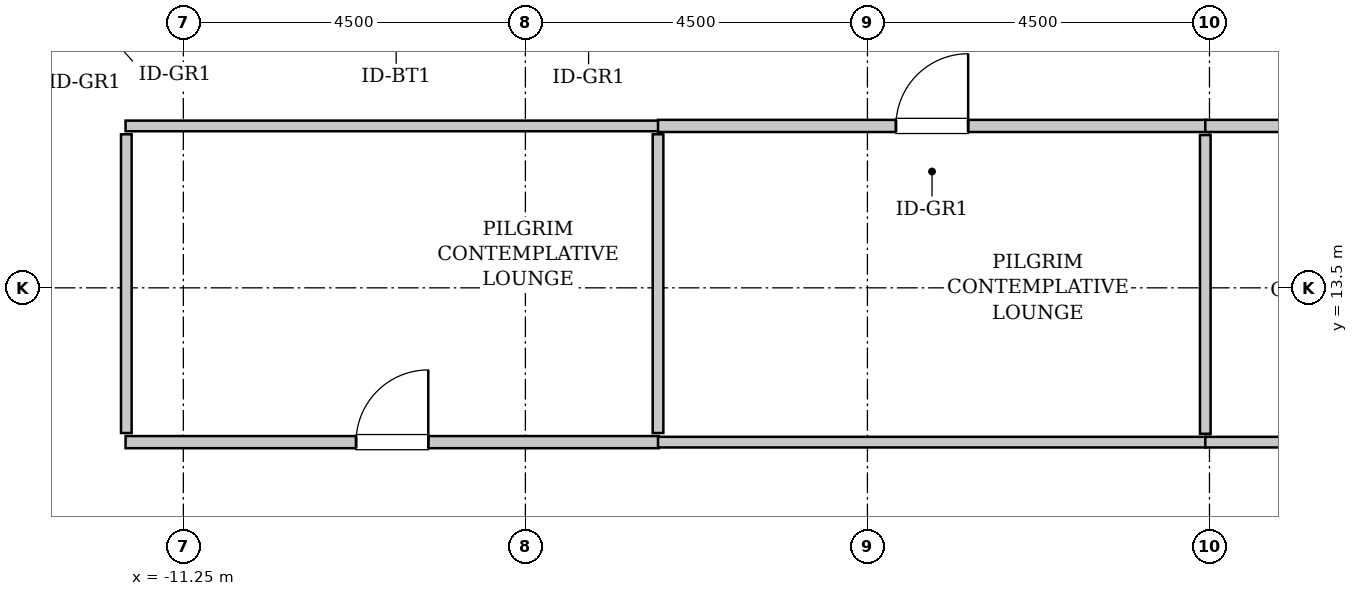
"""IFC4 building model, lengths in metres.
Left out: names, types, materials, properties, quantities, classifications, styles, units other than length and angle.
Written with IfcOpenShell. Run it as: python <this file> out.ifc"""

import sys

from ifc_helpers import new_model, si_unit, direction, frame, frame_2d, origin, place, context, subcontext, project, spatial, rectangle, extrude, source, transform, mapped, element, fill, save


model = new_model("IFC4")
c1 = context("Model", 3, precision=1e-05, world=origin(), true_north=direction((0.0, 1.0)))
c2 = subcontext(c1, "Body", "Model", "MODEL_VIEW")
j1 = project(units=[si_unit("LENGTHUNIT", "METRE"), si_unit("PLANEANGLEUNIT", "RADIAN")], contexts=[c1])
p1 = place(None, origin())
s1 = spatial("IfcSite", under=j1, at=p1, CompositionType="ELEMENT")
p2 = place(p1, origin())
s2 = spatial("IfcBuilding", under=s1, at=p2, CompositionType="ELEMENT")
p3 = place(p2, frame((0.0, 0.0, 248.4)))
s3 = spatial("IfcBuildingStorey", under=s2, at=p3, CompositionType="ELEMENT", Elevation=248.4)
m1 = source(origin(), c2, "Body", "SweptSolid", [
    extrude(rectangle(XDim=7.015, YDim=0.16, at=frame_2d((3.507, 0.0))), origin(), (0.0, 0.0, 1.0), 3.535),
])
p4 = place(p3, frame((-12.01, 11.47, 0.0), z_axis=(0.0, 0.0, 1.0), x_axis=(1.0, 0.0, 0.0)))
e1 = element("IfcWall", 1, at=p4, inside=s3, PredefinedType="PARTITIONING", context=c2, shape_type="MappedRepresentation", body=[
    mapped(m1, transform((0.0, 0.0, 0.0), x_axis=(1.0, 0.0, 0.0), y_axis=(0.0, 1.0, 0.0), z_axis=(0.0, 0.0, 1.0), scale=1.0)),
])
p5 = place(p4, frame((3.032, 0.0, 0.0)))
e2 = element("IfcOpeningElement", 2, at=p5, cuts=e1, PredefinedType="OPENING", context=c2, shape_type="SweptSolid", body=[
    extrude(rectangle(XDim=0.95, YDim=2.1, at=frame_2d((0.475, 1.05))), frame((0.0, 0.09, 0.0), z_axis=(0.0, -1.0, 0.0), x_axis=(1.0, 0.0, 0.0)), (0.0, 0.0, 1.0), 0.18),
])
m2 = source(origin(), c2, "Body", "SweptSolid", [
    extrude(rectangle(XDim=7.015, YDim=0.14, at=frame_2d((3.507, 0.0))), origin(), (0.0, 0.0, 1.0), 3.535),
])
p6 = place(p3, frame((-12.01, 15.63, 0.0), z_axis=(0.0, 0.0, 1.0), x_axis=(1.0, 0.0, 0.0)))
e3 = element("IfcWall", 3, at=p6, inside=s3, PredefinedType="PARTITIONING", context=c2, shape_type="MappedRepresentation", body=[
    mapped(m2, transform((0.0, 0.0, 0.0), x_axis=(1.0, 0.0, 0.0), y_axis=(0.0, 1.0, 0.0), z_axis=(0.0, 0.0, 1.0), scale=1.0)),
])
m3 = source(origin(), c2, "Body", "SweptSolid", [
    extrude(rectangle(XDim=3.93, YDim=0.14, at=frame_2d((1.965, 0.0))), origin(), (0.0, 0.0, 1.0), 3.535),
])
for number, where, z_axis, x_axis in (
    (4, (-12.0, 11.59, 0.0), (0.0, 0.0, 1.0), (0.0, 1.0, 0.0)),
    (5, (-5.005, 11.59, 0.0), (0.0, 0.0, 1.0), (0.0, 1.0, 0.0)),
):
    element("IfcWall", number, at=place(p3, frame(where, z_axis=z_axis, x_axis=x_axis)), inside=s3, PredefinedType="PARTITIONING", context=c2, shape_type="MappedRepresentation", body=[
        mapped(m3, transform((0.0, 0.0, 0.0), x_axis=(1.0, 0.0, 0.0), y_axis=(0.0, 1.0, 0.0), z_axis=(0.0, 0.0, 1.0), scale=1.0)),
    ])
m4 = source(origin(), c2, "Body", "SweptSolid", [
    extrude(rectangle(XDim=7.21, YDim=0.16, at=frame_2d((3.605, 0.0))), origin(), (0.0, 0.0, 1.0), 3.535),
])
p7 = place(p3, frame((-5.005, 15.63, 0.0), z_axis=(0.0, 0.0, 1.0), x_axis=(1.0, 0.0, 0.0)))
e6 = element("IfcWall", 6, at=p7, inside=s3, PredefinedType="PARTITIONING", context=c2, shape_type="MappedRepresentation", body=[
    mapped(m4, transform((0.0, 0.0, 0.0), x_axis=(1.0, 0.0, 0.0), y_axis=(0.0, 1.0, 0.0), z_axis=(0.0, 0.0, 1.0), scale=1.0)),
])
p8 = place(p7, frame((3.13, 0.0, 0.0)))
e7 = element("IfcOpeningElement", 7, at=p8, cuts=e6, PredefinedType="OPENING", context=c2, shape_type="SweptSolid", body=[
    extrude(rectangle(XDim=0.95, YDim=2.1, at=frame_2d((0.475, 1.05))), frame((0.0, 0.09, 0.0), z_axis=(0.0, -1.0, 0.0), x_axis=(1.0, 0.0, 0.0)), (0.0, 0.0, 1.0), 0.18),
])
m5 = source(origin(), c2, "Body", "SweptSolid", [
    extrude(rectangle(XDim=7.21, YDim=0.14, at=frame_2d((3.605, 0.0))), origin(), (0.0, 0.0, 1.0), 3.535),
])
p9 = place(p3, frame((-5.005, 11.47, 0.0), z_axis=(0.0, 0.0, 1.0), x_axis=(1.0, 0.0, 0.0)))
e8 = element("IfcWall", 8, at=p9, inside=s3, PredefinedType="PARTITIONING", context=c2, shape_type="MappedRepresentation", body=[
    mapped(m5, transform((0.0, 0.0, 0.0), x_axis=(1.0, 0.0, 0.0), y_axis=(0.0, 1.0, 0.0), z_axis=(0.0, 0.0, 1.0), scale=1.0)),
])
p10 = place(p3, frame((2.195, 11.58, 0.0), z_axis=(0.0, 0.0, 1.0), x_axis=(0.0, 1.0, 0.0)))
e9 = element("IfcWall", 9, at=p10, inside=s3, PredefinedType="PARTITIONING", context=c2, shape_type="MappedRepresentation", body=[
    mapped(m3, transform((0.0, 0.0, 0.0), x_axis=(1.0, 0.0, 0.0), y_axis=(0.0, 1.0, 0.0), z_axis=(0.0, 0.0, 1.0), scale=1.0)),
])
m6 = source(origin(), c2, "Body", "SweptSolid", [
    extrude(rectangle(XDim=6.21, YDim=0.16, at=frame_2d((3.105, 0.0))), origin(), (0.0, 0.0, 1.0), 3.535),
])
p11 = place(p3, frame((2.195, 15.63, 0.0), z_axis=(0.0, 0.0, 1.0), x_axis=(1.0, 0.0, 0.0)))
e10 = element("IfcWall", 10, at=p11, inside=s3, PredefinedType="PARTITIONING", context=c2, shape_type="MappedRepresentation", body=[
    mapped(m6, transform((0.0, 0.0, 0.0), x_axis=(1.0, 0.0, 0.0), y_axis=(0.0, 1.0, 0.0), z_axis=(0.0, 0.0, 1.0), scale=1.0)),
])
p12 = place(p11, frame((2.63, 0.0, 0.0)))
e11 = element("IfcOpeningElement", 11, at=p12, cuts=e10, PredefinedType="OPENING", context=c2, shape_type="SweptSolid", body=[
    extrude(rectangle(XDim=0.95, YDim=2.1, at=frame_2d((0.475, 1.05))), frame((0.0, 0.09, 0.0), z_axis=(0.0, -1.0, 0.0), x_axis=(1.0, 0.0, 0.0)), (0.0, 0.0, 1.0), 0.18),
])
m7 = source(origin(), c2, "Body", "SweptSolid", [
    extrude(rectangle(XDim=6.21, YDim=0.14, at=frame_2d((3.105, 0.0))), origin(), (0.0, 0.0, 1.0), 3.535),
])
p13 = place(p3, frame((2.195, 11.47, 0.0), z_axis=(0.0, 0.0, 1.0), x_axis=(1.0, 0.0, 0.0)))
e12 = element("IfcWall", 12, at=p13, inside=s3, PredefinedType="PARTITIONING", context=c2, shape_type="MappedRepresentation", body=[
    mapped(m7, transform((0.0, 0.0, 0.0), x_axis=(1.0, 0.0, 0.0), y_axis=(0.0, 1.0, 0.0), z_axis=(0.0, 0.0, 1.0), scale=1.0)),
])
m8 = source(origin(), c2, "Body", "SweptSolid", [
    extrude(rectangle(XDim=0.95, YDim=2.1, at=frame_2d((0.475, 1.05))), frame((0.0, 0.025, 0.0), z_axis=(0.0, -1.0, 0.0), x_axis=(1.0, 0.0, 0.0)), (0.0, 0.0, 1.0), 0.05),
])
p14 = place(p5, origin())
e13 = element("IfcDoor", 13, at=p14, inside=s3, OperationType="SINGLE_SWING_RIGHT", PredefinedType="DOOR", context=c2, shape_type="MappedRepresentation", body=[
    mapped(m8, transform((0.0, 0.0, 0.0), x_axis=(1.0, 0.0, 0.0), y_axis=(0.0, 1.0, 0.0), z_axis=(0.0, 0.0, 1.0), scale=1.0)),
])
fill(e2, e13)
p15 = place(p8, origin())
e14 = element("IfcDoor", 14, at=p15, inside=s3, OperationType="SINGLE_SWING_RIGHT", PredefinedType="DOOR", context=c2, shape_type="MappedRepresentation", body=[
    mapped(m8, transform((0.0, 0.0, 0.0), x_axis=(1.0, 0.0, 0.0), y_axis=(0.0, 1.0, 0.0), z_axis=(0.0, 0.0, 1.0), scale=1.0)),
])
fill(e7, e14)
save(model, sys.argv[1])
